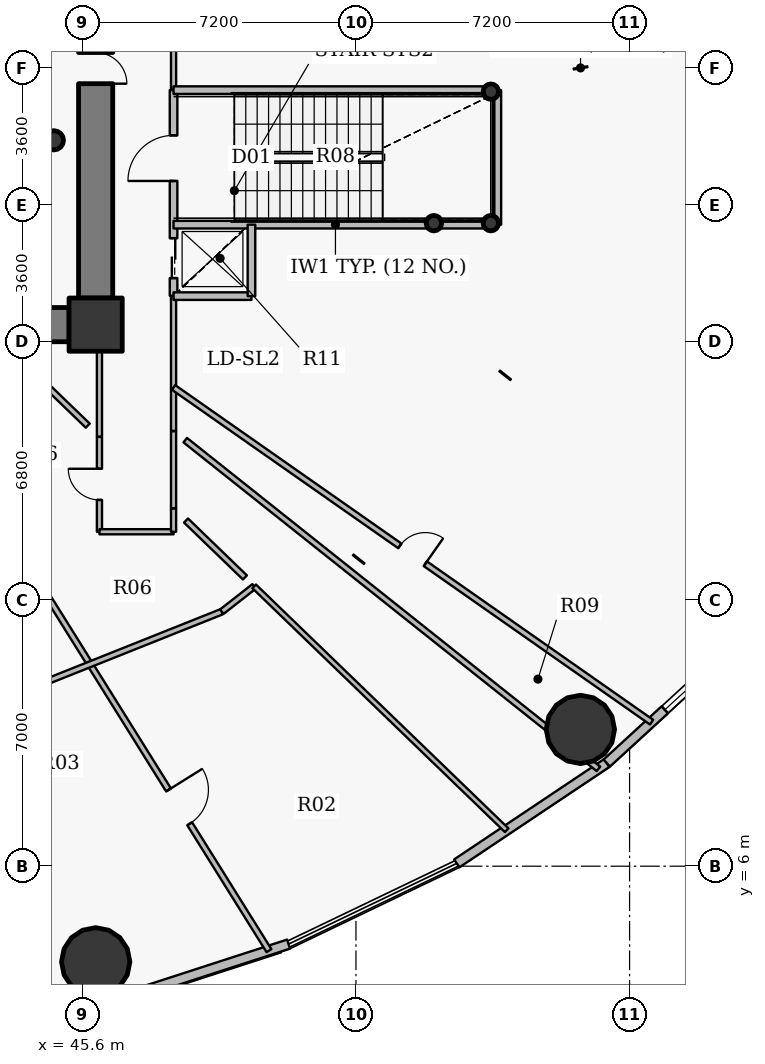
"""IFC4 building model, lengths in metres.
Left out: names, types, materials, properties, quantities, classifications, styles, units other than length and angle.
Written with IfcOpenShell. Run it as: python <this file> out.ifc"""

import sys

from ifc_helpers import new_model, si_unit, direction, frame, frame_2d, origin, origin_2d, place, context, subcontext, project, spatial, rectangle, hollow_circle, extrude, source, transform, mapped, element, fill, save


model = new_model("IFC4")
c1 = context("Model", 3, precision=1e-05, world=origin(), true_north=direction((0.0, 1.0)))
c2 = subcontext(c1, "Body", "Model", "MODEL_VIEW")
j1 = project(units=[si_unit("LENGTHUNIT", "METRE"), si_unit("PLANEANGLEUNIT", "RADIAN")], contexts=[c1])
p1 = place(None, origin())
s1 = spatial("IfcSite", under=j1, at=p1, CompositionType="ELEMENT")
p2 = place(p1, origin())
s2 = spatial("IfcBuilding", under=s1, at=p2, CompositionType="ELEMENT")
p3 = place(p2, frame((0.0, 0.0, 6.0)))
s3 = spatial("IfcBuildingStorey", under=s2, at=p3, CompositionType="ELEMENT", Elevation=6.0)
p4 = place(p3, frame((45.95, 20.25, 0.0), z_axis=(0.0, 0.0, 1.0), x_axis=(1.0, 0.0, 0.0)))
e1 = element("IfcColumn", 1, at=p4, inside=s3, PredefinedType="COLUMN", context=c2, shape_type="SweptSolid", body=[
    extrude(rectangle(XDim=1.4, YDim=1.4, at=origin_2d()), origin(), (0.0, 0.0, 1.0), 4.2),
])
for number, where, z_axis, x_axis in (
    (2, (56.35, 26.38, 0.0), (0.0, 0.0, 1.0), (1.0, 0.0, 0.0)),
    (3, (56.35, 22.92, 0.0), (0.0, 0.0, 1.0), (1.0, 0.0, 0.0)),
    (4, (54.85, 22.92, 0.0), (0.0, 0.0, 1.0), (1.0, 0.0, 0.0)),
):
    element("IfcColumn", number, at=place(p3, frame(where, z_axis=z_axis, x_axis=x_axis)), inside=s3, PredefinedType="COLUMN", context=c2, shape_type="SweptSolid", body=[
        extrude(hollow_circle(Radius=0.203, WallThickness=0.016, at=origin_2d()), origin(), (0.0, 0.0, 1.0), 4.2),
    ])
p5 = place(p3, frame((45.95, 33.05, 0.0), z_axis=(0.0, 0.0, 1.0), x_axis=(0.0, -1.0, 0.0)))
e5 = element("IfcWall", 5, at=p5, inside=s3, PredefinedType="SHEAR", context=c2, shape_type="SweptSolid", body=[
    extrude(rectangle(XDim=12.1, YDim=0.9, at=frame_2d((6.05, 0.0))), origin(), (0.0, 0.0, 1.0), 3.35),
])
p6 = place(p5, frame((5.64, 0.0, 0.0)))
e6 = element("IfcOpeningElement", 6, at=p6, cuts=e5, PredefinedType="OPENING", context=c2, shape_type="SweptSolid", body=[
    extrude(rectangle(XDim=0.82, YDim=2.1, at=origin_2d()), frame((0.41, 0.46, 1.05), z_axis=(0.0, -1.0, 0.0), x_axis=(1.0, 0.0, 0.0)), (0.0, 0.0, 1.0), 0.92),
])
p7 = place(p3, frame((45.25, 20.25, 0.0), z_axis=(0.0, 0.0, 1.0), x_axis=(-1.0, 0.0, 0.0)))
e7 = element("IfcWall", 7, at=p7, inside=s3, PredefinedType="SHEAR", context=c2, shape_type="SweptSolid", body=[
    extrude(rectangle(XDim=18.5, YDim=0.9, at=frame_2d((9.25, 0.0))), origin(), (0.0, 0.0, 1.0), 3.35),
])
p8 = place(p7, frame((10.0, 0.0, 0.0)))
e8 = element("IfcOpeningElement", 8, at=p8, cuts=e7, PredefinedType="OPENING", context=c2, shape_type="SweptSolid", body=[
    extrude(rectangle(XDim=1.15, YDim=2.15, at=origin_2d()), frame((0.575, 0.46, 1.075), z_axis=(0.0, -1.0, 0.0), x_axis=(1.0, 0.0, 0.0)), (0.0, 0.0, 1.0), 0.92),
])
for number, where, z_axis, x_axis in (
    (9, (45.951, 3.484, 0.0), (0.0, 0.0, 1.0), (1.0, 0.0, 0.0)),
    (10, (58.705, 9.599, 0.0), (0.0, 0.0, 1.0), (1.0, 0.0, 0.0)),
):
    element("IfcColumn", number, at=place(p3, frame(where, z_axis=z_axis, x_axis=x_axis)), inside=s3, PredefinedType="COLUMN", context=c2, shape_type="SweptSolid", body=[
        extrude(hollow_circle(Radius=0.9, WallThickness=0.05, at=origin_2d()), origin(), (0.0, 0.0, 1.0), 4.2),
    ])
p9 = place(p3, frame((44.85, 25.1, 0.0), z_axis=(0.0, 0.0, 1.0), x_axis=(1.0, 0.0, 0.0)))
e11 = element("IfcColumn", 11, at=p9, inside=s3, PredefinedType="COLUMN", context=c2, shape_type="SweptSolid", body=[
    extrude(hollow_circle(Radius=0.254, WallThickness=0.02, at=origin_2d()), origin(), (0.0, 0.0, 1.0), 4.2),
])
p10 = place(p3, frame((51.026, 3.95, 0.0), z_axis=(0.0, 0.0, 1.0), x_axis=(-0.951198629726, -0.308579271513, 0.0)))
e12 = element("IfcWall", 12, at=p10, inside=s3, PredefinedType="SOLIDWALL", context=c2, shape_type="SweptSolid", body=[
    extrude(rectangle(XDim=5.044, YDim=0.25, at=frame_2d((2.522, 0.0))), origin(), (0.0, 0.0, 1.0), 3.9),
])
p11 = place(p3, frame((59.399, 8.714, 0.0), z_axis=(0.0, 0.0, 1.0), x_axis=(-0.831218664812, -0.555945618985, 0.0)))
e13 = element("IfcWall", 13, at=p11, inside=s3, PredefinedType="SOLIDWALL", context=c2, shape_type="SweptSolid", body=[
    extrude(rectangle(XDim=4.748, YDim=0.25, at=frame_2d((2.374, 0.0))), origin(), (0.0, 0.0, 1.0), 3.9),
])
p12 = place(p3, frame((62.768, 11.802, 0.0), z_axis=(0.0, 0.0, 1.0), x_axis=(-0.737076532105, -0.675809282136, 0.0)))
e14 = element("IfcWall", 14, at=p12, inside=s3, PredefinedType="SOLIDWALL", context=c2, shape_type="SweptSolid", body=[
    extrude(rectangle(XDim=4.571, YDim=0.25, at=frame_2d((2.285, 0.0))), origin(), (0.0, 0.0, 1.0), 3.9),
])
p13 = place(p12, frame((0.896, 0.0, 0.9)))
e15 = element("IfcOpeningElement", 15, at=p13, cuts=e14, PredefinedType="OPENING", context=c2, shape_type="SweptSolid", body=[
    extrude(rectangle(XDim=1.6, YDim=1.75, at=origin_2d()), frame((0.8, 0.135, 0.875), z_axis=(0.0, -1.0, 0.0), x_axis=(1.0, 0.0, 0.0)), (0.0, 0.0, 1.0), 0.27),
])
p14 = place(p3, frame((40.499, 19.8, 0.0), z_axis=(0.0, 0.0, 1.0), x_axis=(0.529919953547, -0.848047665425, 0.0)))
e16 = element("IfcWall", 16, at=p14, inside=s3, PredefinedType="PARTITIONING", context=c2, shape_type="SweptSolid", body=[
    extrude(rectangle(XDim=18.893, YDim=0.15, at=frame_2d((9.447, 0.0))), origin(), (0.0, 0.0, 1.0), 3.285),
])
p15 = place(p14, frame((13.906, 0.0, 0.0)))
e17 = element("IfcOpeningElement", 17, at=p15, cuts=e16, PredefinedType="OPENING", context=c2, shape_type="SweptSolid", body=[
    extrude(rectangle(XDim=1.05, YDim=2.15, at=origin_2d()), frame((0.525, 0.085, 1.075), z_axis=(0.0, -1.0, 0.0), x_axis=(1.0, 0.0, 0.0)), (0.0, 0.0, 1.0), 0.17),
])
p16 = place(p3, frame((42.976, 10.185, 0.0), z_axis=(0.0, 0.0, 1.0), x_axis=(0.928789451967, 0.370607816857, 0.0)))
e18 = element("IfcWall", 18, at=p16, inside=s3, PredefinedType="PARTITIONING", context=c2, shape_type="SweptSolid", body=[
    extrude(rectangle(XDim=6.776, YDim=0.15, at=frame_2d((3.388, 0.0))), origin(), (0.0, 0.0, 1.0), 3.085),
])
p17 = place(p3, frame((46.05, 14.8, 0.0), z_axis=(0.0, 0.0, 1.0), x_axis=(0.0, 1.0, 0.0)))
e19 = element("IfcWall", 19, at=p17, inside=s3, PredefinedType="PARTITIONING", context=c2, shape_type="SweptSolid", body=[
    extrude(rectangle(XDim=2.495, YDim=0.135, at=frame_2d((1.248, 0.0))), origin(), (0.0, 0.0, 1.0), 3.9),
])
p18 = place(p17, frame((0.837, 0.0, 0.0)))
e20 = element("IfcOpeningElement", 20, at=p18, cuts=e19, PredefinedType="OPENING", context=c2, shape_type="SweptSolid", body=[
    extrude(rectangle(XDim=0.82, YDim=2.1, at=origin_2d()), frame((0.41, 0.078, 1.05), z_axis=(0.0, -1.0, 0.0), x_axis=(1.0, 0.0, 0.0)), (0.0, 0.0, 1.0), 0.155),
])
p19 = place(p3, frame((46.05, 14.8, 0.0), z_axis=(0.0, 0.0, 1.0), x_axis=(1.0, 0.0, 0.0)))
e21 = element("IfcWall", 21, at=p19, inside=s3, PredefinedType="PARTITIONING", context=c2, shape_type="SweptSolid", body=[
    extrude(rectangle(XDim=1.95, YDim=0.135, at=frame_2d((0.975, 0.0))), origin(), (0.0, 0.0, 1.0), 3.9),
])
p20 = place(p3, frame((48.0, 14.8, 0.0), z_axis=(0.0, 0.0, 1.0), x_axis=(0.0, 1.0, 0.0)))
e22 = element("IfcWall", 22, at=p20, inside=s3, PredefinedType="PARTITIONING", context=c2, shape_type="SweptSolid", body=[
    extrude(rectangle(XDim=0.612, YDim=0.135, at=frame_2d((0.306, 0.0))), origin(), (0.0, 0.0, 1.0), 3.9),
])
p21 = place(p3, frame((48.0, 17.455, 0.0), z_axis=(0.0, 0.0, 1.0), x_axis=(0.0, 1.0, 0.0)))
e23 = element("IfcWall", 23, at=p21, inside=s3, PredefinedType="PARTITIONING", context=c2, shape_type="SweptSolid", body=[
    extrude(rectangle(XDim=3.545, YDim=0.135, at=frame_2d((1.772, 0.0))), origin(), (0.0, 0.0, 1.0), 3.085),
])
p22 = place(p3, frame((48.0, 18.597, 0.0), z_axis=(0.0, 0.0, 1.0), x_axis=(0.819153488973, -0.573574373123, 0.0)))
e24 = element("IfcWall", 24, at=p22, inside=s3, PredefinedType="PARTITIONING", context=c2, shape_type="SweptSolid", body=[
    extrude(rectangle(XDim=15.356, YDim=0.15, at=frame_2d((7.678, 0.0))), origin(), (0.0, 0.0, 1.0), 3.285),
])
p23 = place(p22, frame((7.268, 0.0, 0.0)))
e25 = element("IfcOpeningElement", 25, at=p23, cuts=e24, PredefinedType="OPENING", context=c2, shape_type="SweptSolid", body=[
    extrude(rectangle(XDim=0.82, YDim=2.1, at=origin_2d()), frame((0.41, 0.085, 1.05), z_axis=(0.0, -1.0, 0.0), x_axis=(1.0, 0.0, 0.0)), (0.0, 0.0, 1.0), 0.17),
])
p24 = place(p3, frame((48.0, 21.01, 0.0), z_axis=(0.0, 0.0, 1.0), x_axis=(0.0, 1.0, 0.0)))
e26 = element("IfcWall", 26, at=p24, inside=s3, PredefinedType="PARTITIONING", context=c2, shape_type="SweptSolid", body=[
    extrude(rectangle(XDim=5.41, YDim=0.2, at=frame_2d((2.705, 0.0))), origin(), (0.0, 0.0, 1.0), 3.085),
])
p25 = place(p24, frame((3.02, 0.0, 0.0)))
e27 = element("IfcOpeningElement", 27, at=p25, cuts=e26, PredefinedType="OPENING", context=c2, shape_type="SweptSolid", body=[
    extrude(rectangle(XDim=1.2, YDim=2.15, at=origin_2d()), frame((0.6, 0.11, 1.075), z_axis=(0.0, -1.0, 0.0), x_axis=(1.0, 0.0, 0.0)), (0.0, 0.0, 1.0), 0.22),
])
p26 = place(p24, frame((0.465, 0.0, 0.0)))
e28 = element("IfcOpeningElement", 28, at=p26, cuts=e26, PredefinedType="OPENING", context=c2, shape_type="SweptSolid", body=[
    extrude(rectangle(XDim=1.05, YDim=2.15, at=origin_2d()), frame((0.525, 0.11, 1.075), z_axis=(0.0, -1.0, 0.0), x_axis=(1.0, 0.0, 0.0)), (0.0, 0.0, 1.0), 0.22),
])
p27 = place(p3, frame((48.0, 21.0, 0.0), z_axis=(0.0, 0.0, 1.0), x_axis=(1.0, 0.0, 0.0)))
e29 = element("IfcWall", 29, at=p27, inside=s3, PredefinedType="PARTITIONING", context=c2, shape_type="SweptSolid", body=[
    extrude(rectangle(XDim=2.05, YDim=0.2, at=frame_2d((1.025, 0.0))), origin(), (0.0, 0.0, 1.0), 3.9),
])
p28 = place(p3, frame((48.0, 22.88, 0.0), z_axis=(0.0, 0.0, 1.0), x_axis=(1.0, 0.0, 0.0)))
e30 = element("IfcWall", 30, at=p28, inside=s3, PredefinedType="PARTITIONING", context=c2, shape_type="SweptSolid", body=[
    extrude(rectangle(XDim=8.52, YDim=0.2, at=frame_2d((4.26, 0.0))), origin(), (0.0, 0.0, 1.0), 3.9),
])
p29 = place(p3, frame((48.0, 26.43, 0.0), z_axis=(0.0, 0.0, 1.0), x_axis=(0.0, 1.0, 0.0)))
e31 = element("IfcWall", 31, at=p29, inside=s3, PredefinedType="PARTITIONING", context=c2, shape_type="SweptSolid", body=[
    extrude(rectangle(XDim=14.77, YDim=0.135, at=frame_2d((7.385, 0.0))), origin(), (0.0, 0.0, 1.0), 3.085),
])
p30 = place(p29, frame((4.815, 0.0, 0.0)))
e32 = element("IfcOpeningElement", 32, at=p30, cuts=e31, PredefinedType="OPENING", context=c2, shape_type="SweptSolid", body=[
    extrude(rectangle(XDim=1.05, YDim=2.15, at=origin_2d()), frame((0.525, 0.078, 1.075), z_axis=(0.0, -1.0, 0.0), x_axis=(1.0, 0.0, 0.0)), (0.0, 0.0, 1.0), 0.155),
])
p31 = place(p3, frame((48.0, 26.42, 0.0), z_axis=(0.0, 0.0, 1.0), x_axis=(1.0, 0.0, 0.0)))
e33 = element("IfcWall", 33, at=p31, inside=s3, PredefinedType="PARTITIONING", context=c2, shape_type="SweptSolid", body=[
    extrude(rectangle(XDim=8.52, YDim=0.2, at=frame_2d((4.26, 0.0))), origin(), (0.0, 0.0, 1.0), 3.9),
])
p32 = place(p3, frame((49.27, 12.697, 0.0), z_axis=(0.0, 0.0, 1.0), x_axis=(0.787281025789, 0.616594345119, 0.0)))
e34 = element("IfcWall", 34, at=p32, inside=s3, PredefinedType="PARTITIONING", context=c2, shape_type="SweptSolid", body=[
    extrude(rectangle(XDim=1.081, YDim=0.15, at=frame_2d((0.541, 0.0))), origin(), (0.0, 0.0, 1.0), 3.9),
])
p33 = place(p3, frame((50.05, 21.0, 0.0), z_axis=(0.0, 0.0, 1.0), x_axis=(0.0, 1.0, 0.0)))
e35 = element("IfcWall", 35, at=p33, inside=s3, PredefinedType="PARTITIONING", context=c2, shape_type="SweptSolid", body=[
    extrude(rectangle(XDim=1.88, YDim=0.2, at=frame_2d((0.94, 0.0))), origin(), (0.0, 0.0, 1.0), 3.085),
])
p34 = place(p3, frame((56.52, 22.88, 0.0), z_axis=(0.0, 0.0, 1.0), x_axis=(0.0, 1.0, 0.0)))
e36 = element("IfcWall", 36, at=p34, inside=s3, PredefinedType="PARTITIONING", context=c2, shape_type="SweptSolid", body=[
    extrude(rectangle(XDim=3.54, YDim=0.2, at=frame_2d((1.77, 0.0))), origin(), (0.0, 0.0, 1.0), 3.9),
])
p35 = place(p3, frame((48.0, 17.445, 0.0), z_axis=(0.0, 0.0, 1.0), x_axis=(0.0, -1.0, 0.0)))
e37 = element("IfcWall", 37, at=p35, inside=s3, PredefinedType="PARTITIONING", context=c2, shape_type="SweptSolid", body=[
    extrude(rectangle(XDim=2.023, YDim=0.135, at=frame_2d((1.012, 0.0))), origin(), (0.0, 0.0, 1.0), 3.9),
])
p36 = place(p3, frame((46.05, 17.305, 0.0), z_axis=(0.0, 0.0, 1.0), x_axis=(0.0, 1.0, 0.0)))
e38 = element("IfcWall", 38, at=p36, inside=s3, PredefinedType="PARTITIONING", context=c2, shape_type="SweptSolid", body=[
    extrude(rectangle(XDim=2.495, YDim=0.135, at=frame_2d((1.248, 0.0))), origin(), (0.0, 0.0, 1.0), 3.085),
])
p37 = place(p3, frame((46.4, 19.8, 0.0), z_axis=(0.0, 0.0, 1.0), x_axis=(0.0, 1.0, 0.0)))
e39 = element("IfcWall", 39, at=p37, inside=s3, PredefinedType="PARTITIONING", context=c2, shape_type="SweptSolid", body=[
    extrude(rectangle(XDim=1.14, YDim=0.135, at=frame_2d((0.57, 0.0))), origin(), (0.0, 0.0, 1.0), 3.9),
])
p38 = place(p3, frame((43.725, 19.54, 0.0), z_axis=(0.0, 0.0, 1.0), x_axis=(0.719317456081, -0.69468150787, 0.0)))
e40 = element("IfcWall", 40, at=p38, inside=s3, PredefinedType="PARTITIONING", context=c2, shape_type="SweptSolid", body=[
    extrude(rectangle(XDim=2.804, YDim=0.15, at=frame_2d((1.402, 0.0))), origin(), (0.0, 0.0, 1.0), 3.9),
])
p39 = place(p3, frame((48.327, 15.095, 0.0), z_axis=(0.0, 0.0, 1.0), x_axis=(0.719401460617, -0.6945945137, 0.0)))
e41 = element("IfcWall", 41, at=p39, inside=s3, PredefinedType="PARTITIONING", context=c2, shape_type="SweptSolid", body=[
    extrude(rectangle(XDim=2.155, YDim=0.15, at=frame_2d((1.078, 0.0))), origin(), (0.0, 0.0, 1.0), 3.9),
])
p40 = place(p3, frame((50.121, 13.363, 0.0), z_axis=(0.0, 0.0, 1.0), x_axis=(0.719341799646, -0.69465630011, 0.0)))
e42 = element("IfcWall", 42, at=p40, inside=s3, PredefinedType="PARTITIONING", context=c2, shape_type="SweptSolid", body=[
    extrude(rectangle(XDim=9.237, YDim=0.135, at=frame_2d((4.619, 0.0))), origin(), (0.0, 0.0, 1.0), 3.285),
])
p41 = place(p3, frame((59.18, 8.562, 0.0), z_axis=(0.0, 0.0, 1.0), x_axis=(-0.782605918506, 0.622517450614, 0.0)))
e43 = element("IfcWall", 43, at=p41, inside=s3, PredefinedType="PARTITIONING", context=c2, shape_type="SweptSolid", body=[
    extrude(rectangle(XDim=13.893, YDim=0.15, at=frame_2d((6.947, 0.0))), origin(), (0.0, 0.0, 1.0), 3.285),
])
m1 = source(origin(), c2, "Body", "SweptSolid", [
    extrude(rectangle(XDim=1.6, YDim=1.75, at=origin_2d()), frame((0.8, 0.03, 0.875), z_axis=(0.0, -1.0, 0.0), x_axis=(1.0, 0.0, 0.0)), (0.0, 0.0, 1.0), 0.06),
])
p42 = place(p13, origin())
e44 = element("IfcWindow", 44, at=p42, inside=s3, PartitioningType="DOUBLE_PANEL_VERTICAL", PredefinedType="WINDOW", context=c2, shape_type="MappedRepresentation", body=[
    mapped(m1, transform((0.0, 0.0, 0.0), x_axis=(1.0, 0.0, 0.0), y_axis=(0.0, 1.0, 0.0), z_axis=(0.0, 0.0, 1.0), scale=1.0)),
])
fill(e15, e44)
m2 = source(origin(), c2, "Body", "SweptSolid", [
    extrude(rectangle(XDim=0.82, YDim=2.1, at=origin_2d()), frame((0.41, 0.025, 1.05), z_axis=(0.0, -1.0, 0.0), x_axis=(1.0, 0.0, 0.0)), (0.0, 0.0, 1.0), 0.05),
])
p43 = place(p6, origin())
e45 = element("IfcDoor", 45, at=p43, inside=s3, OperationType="SINGLE_SWING_RIGHT", PredefinedType="DOOR", context=c2, shape_type="MappedRepresentation", body=[
    mapped(m2, transform((0.0, 0.0, 0.0), x_axis=(1.0, 0.0, 0.0), y_axis=(0.0, 1.0, 0.0), z_axis=(0.0, 0.0, 1.0), scale=1.0)),
])
fill(e6, e45)
m3 = source(origin(), c2, "Body", "SweptSolid", [
    extrude(rectangle(XDim=1.2, YDim=2.15, at=origin_2d()), frame((0.6, 0.025, 1.075), z_axis=(0.0, -1.0, 0.0), x_axis=(1.0, 0.0, 0.0)), (0.0, 0.0, 1.0), 0.05),
])
p44 = place(p25, origin())
e46 = element("IfcDoor", 46, at=p44, inside=s3, OperationType="SINGLE_SWING_LEFT", PredefinedType="DOOR", context=c2, shape_type="MappedRepresentation", body=[
    mapped(m3, transform((0.0, 0.0, 0.0), x_axis=(1.0, 0.0, 0.0), y_axis=(0.0, 1.0, 0.0), z_axis=(0.0, 0.0, 1.0), scale=1.0)),
])
fill(e27, e46)
m4 = source(origin(), c2, "Body", "SweptSolid", [
    extrude(rectangle(XDim=1.05, YDim=2.15, at=origin_2d()), frame((0.525, 0.025, 1.075), z_axis=(0.0, -1.0, 0.0), x_axis=(1.0, 0.0, 0.0)), (0.0, 0.0, 1.0), 0.05),
])
p45 = place(p26, origin())
e47 = element("IfcDoor", 47, at=p45, inside=s3, OperationType="DOUBLE_DOOR_SLIDING", PredefinedType="USERDEFINED", context=c2, shape_type="MappedRepresentation", body=[
    mapped(m4, transform((0.0, 0.0, 0.0), x_axis=(1.0, 0.0, 0.0), y_axis=(0.0, 1.0, 0.0), z_axis=(0.0, 0.0, 1.0), scale=1.0)),
])
fill(e28, e47)
p46 = place(p18, origin())
e48 = element("IfcDoor", 48, at=p46, inside=s3, OperationType="SINGLE_SWING_RIGHT", PredefinedType="DOOR", context=c2, shape_type="MappedRepresentation", body=[
    mapped(m2, transform((0.0, 0.0, 0.0), x_axis=(1.0, 0.0, 0.0), y_axis=(0.0, 1.0, 0.0), z_axis=(0.0, 0.0, 1.0), scale=1.0)),
])
fill(e20, e48)
m5 = source(origin(), c2, "Body", "SweptSolid", [
    extrude(rectangle(XDim=1.05, YDim=2.15, at=origin_2d()), frame((0.525, 0.025, 1.075), z_axis=(0.0, -1.0, 0.0), x_axis=(1.0, 0.0, 0.0)), (0.0, 0.0, 1.0), 0.05),
])
p47 = place(p15, origin())
e49 = element("IfcDoor", 49, at=p47, inside=s3, OperationType="SINGLE_SWING_LEFT", PredefinedType="DOOR", context=c2, shape_type="MappedRepresentation", body=[
    mapped(m5, transform((0.0, 0.0, 0.0), x_axis=(1.0, 0.0, 0.0), y_axis=(0.0, 1.0, 0.0), z_axis=(0.0, 0.0, 1.0), scale=1.0)),
])
fill(e17, e49)
p48 = place(p23, origin())
e50 = element("IfcDoor", 50, at=p48, inside=s3, OperationType="SINGLE_SWING_RIGHT", PredefinedType="DOOR", context=c2, shape_type="MappedRepresentation", body=[
    mapped(m2, transform((0.0, 0.0, 0.0), x_axis=(1.0, 0.0, 0.0), y_axis=(0.0, 1.0, 0.0), z_axis=(0.0, 0.0, 1.0), scale=1.0)),
])
fill(e25, e50)
save(model, sys.argv[1])
